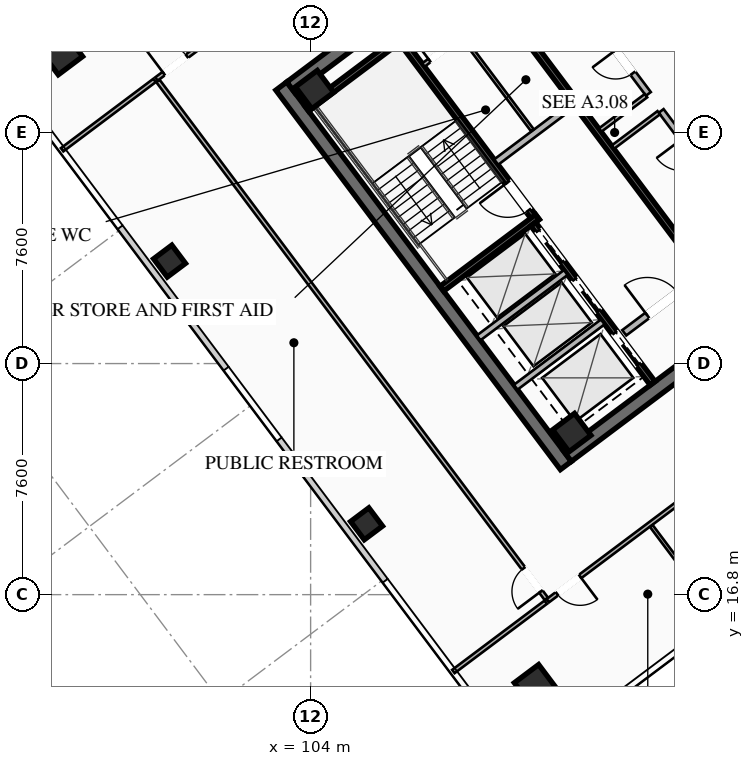
"""IFC4 building model, lengths in metres.
Left out: names, types, materials, properties, quantities, classifications, styles, units other than length and angle.
Written with IfcOpenShell. Run it as: python <this file> out.ifc"""

import sys

from ifc_helpers import new_model, si_unit, direction, frame, frame_2d, origin, origin_2d, place, context, subcontext, project, spatial, rectangle, hollow_rectangle, extrude, element, fill, save


model = new_model("IFC4")
c1 = context("Model", 3, precision=1e-05, world=origin(), true_north=direction((0.0, 1.0)))
c2 = subcontext(c1, "Body", "Model", "MODEL_VIEW")
j1 = project(units=[si_unit("LENGTHUNIT", "METRE"), si_unit("PLANEANGLEUNIT", "RADIAN")], contexts=[c1])
p1 = place(None, origin())
s1 = spatial("IfcSite", under=j1, at=p1, CompositionType="ELEMENT")
p2 = place(p1, origin())
s2 = spatial("IfcBuilding", under=s1, at=p2, CompositionType="ELEMENT")
p3 = place(p2, frame((0.0, 0.0, 239.7)))
s3 = spatial("IfcBuildingStorey", under=s2, at=p3, CompositionType="ELEMENT", Elevation=239.7)
for number, where, z_axis, x_axis in (
    (1, (112.396, 21.047, 0.0), (0.0, 0.0, 1.0), (-0.6, 0.8, 0.0)),
    (2, (115.604, 42.953, 0.0), (0.0, 0.0, 1.0), (0.6, -0.8, 0.0)),
):
    element("IfcWall", number, at=place(p3, frame(where, z_axis=z_axis, x_axis=x_axis)), inside=s3, PredefinedType="SHEAR", context=c2, shape_type="SweptSolid", body=[
        extrude(rectangle(XDim=15.6, YDim=0.45, at=frame_2d((7.8, 0.0))), origin(), (0.0, 0.0, 1.0), 3.55),
    ])
p4 = place(p3, frame((124.649, 30.518, 0.0), z_axis=(0.0, 0.0, 1.0), x_axis=(-0.8, -0.6, 0.0)))
e3 = element("IfcWall", 3, at=p4, inside=s3, PredefinedType="SHEAR", context=c2, shape_type="SweptSolid", body=[
    extrude(rectangle(XDim=15.26, YDim=0.45, at=frame_2d((7.63, 0.0))), origin(), (0.0, 0.0, 1.0), 3.55),
])
p5 = place(p4, frame((9.33, 0.0, 0.0)))
e4 = element("IfcOpeningElement", 4, at=p5, cuts=e3, PredefinedType="OPENING", context=c2, shape_type="SweptSolid", body=[
    extrude(rectangle(XDim=1.25, YDim=2.25, at=frame_2d((0.625, 1.125))), frame((0.0, 0.235, 0.0), z_axis=(0.0, -1.0, 0.0), x_axis=(1.0, 0.0, 0.0)), (0.0, 0.0, 1.0), 0.47),
])
p6 = place(p4, frame((4.28, 0.0, 0.0)))
e5 = element("IfcOpeningElement", 5, at=p6, cuts=e3, PredefinedType="OPENING", context=c2, shape_type="SweptSolid", body=[
    extrude(rectangle(XDim=1.25, YDim=2.25, at=frame_2d((0.625, 1.125))), frame((0.0, 0.235, 0.0), z_axis=(0.0, -1.0, 0.0), x_axis=(1.0, 0.0, 0.0)), (0.0, 0.0, 1.0), 0.47),
])
p7 = place(p3, frame((103.351, 33.482, 0.0), z_axis=(0.0, 0.0, 1.0), x_axis=(0.8, 0.6, 0.0)))
e6 = element("IfcWall", 6, at=p7, inside=s3, PredefinedType="SHEAR", context=c2, shape_type="SweptSolid", body=[
    extrude(rectangle(XDim=15.26, YDim=0.45, at=frame_2d((7.63, 0.0))), origin(), (0.0, 0.0, 1.0), 3.55),
])
p8 = place(p7, frame((4.68, 0.0, 0.0)))
e7 = element("IfcOpeningElement", 7, at=p8, cuts=e6, PredefinedType="OPENING", context=c2, shape_type="SweptSolid", body=[
    extrude(rectangle(XDim=1.25, YDim=2.25, at=frame_2d((0.625, 1.125))), frame((0.0, 0.235, 0.0), z_axis=(0.0, -1.0, 0.0), x_axis=(1.0, 0.0, 0.0)), (0.0, 0.0, 1.0), 0.47),
])
p9 = place(p7, frame((9.73, 0.0, 0.0)))
e8 = element("IfcOpeningElement", 8, at=p9, cuts=e6, PredefinedType="OPENING", context=c2, shape_type="SweptSolid", body=[
    extrude(rectangle(XDim=1.25, YDim=2.25, at=frame_2d((0.625, 1.125))), frame((0.0, 0.235, 0.0), z_axis=(0.0, -1.0, 0.0), x_axis=(1.0, 0.0, 0.0)), (0.0, 0.0, 1.0), 0.47),
])
for number, where, z_axis, x_axis in (
    (9, (112.59, 22.13, 0.0), (0.0, 0.0, 1.0), (0.8, 0.6, 0.0)),
    (10, (104.13, 33.41, 0.0), (0.0, 0.0, 1.0), (0.8, 0.6, 0.0)),
):
    element("IfcColumn", number, at=place(p3, frame(where, z_axis=z_axis, x_axis=x_axis)), inside=s3, PredefinedType="COLUMN", context=c2, shape_type="SweptSolid", body=[
        extrude(hollow_rectangle(XDim=0.9, YDim=0.9, WallThickness=0.04, at=origin_2d()), origin(), (0.0, 0.0, 1.0), 3.37),
    ])
for number, where, z_axis, x_axis in (
    (11, (111.4, 13.8, 0.0), (0.0, 0.0, 1.0), (0.8, 0.6, 0.0)),
    (12, (95.8, 34.6, 0.0), (0.0, 0.0, 1.0), (0.8, 0.6, 0.0)),
):
    element("IfcColumn", number, at=place(p3, frame(where, z_axis=z_axis, x_axis=x_axis)), inside=s3, PredefinedType="COLUMN", context=c2, shape_type="SweptSolid", body=[
        extrude(hollow_rectangle(XDim=1.0, YDim=1.0, WallThickness=0.04, at=origin_2d()), origin(), (0.0, 0.0, 1.0), 3.37),
    ])
for number, where, z_axis, x_axis in (
    (13, (99.36, 27.77, 0.0), (0.0, 0.0, 1.0), (0.8, 0.6, 0.0)),
    (14, (105.84, 19.13, 0.0), (0.0, 0.0, 1.0), (0.8, 0.6, 0.0)),
):
    element("IfcColumn", number, at=place(p3, frame(where, z_axis=z_axis, x_axis=x_axis)), inside=s3, PredefinedType="COLUMN", context=c2, shape_type="SweptSolid", body=[
        extrude(hollow_rectangle(XDim=0.75, YDim=0.75, WallThickness=0.032, at=origin_2d()), origin(), (0.0, 0.0, 1.0), 3.37),
    ])
p10 = place(p3, frame((111.44, 29.08, 0.0), z_axis=(0.0, 0.0, 1.0), x_axis=(-0.59999041401, 0.800007189403, 0.0)))
e15 = element("IfcWall", 15, at=p10, inside=s3, PredefinedType="SHEAR", context=c2, shape_type="SweptSolid", body=[
    extrude(rectangle(XDim=8.15, YDim=0.2, at=frame_2d((4.075, 0.0))), origin(), (0.0, 0.0, 1.0), 3.37),
])
p11 = place(p10, frame((0.45, 0.0, 0.0)))
e16 = element("IfcOpeningElement", 16, at=p11, cuts=e15, PredefinedType="OPENING", context=c2, shape_type="SweptSolid", body=[
    extrude(rectangle(XDim=1.15, YDim=2.2, at=frame_2d((0.575, 1.1))), frame((0.0, 0.11, 0.0), z_axis=(0.0, -1.0, 0.0), x_axis=(1.0, 0.0, 0.0)), (0.0, 0.0, 1.0), 0.22),
])
for number, where, z_axis, x_axis in (
    (17, (108.316, 26.862, 0.0), (0.0, 0.0, 1.0), (0.8, 0.6, 0.0)),
    (18, (103.876, 32.782, 0.0), (0.0, 0.0, 1.0), (0.8, 0.6, 0.0)),
):
    element("IfcWall", number, at=place(p3, frame(where, z_axis=z_axis, x_axis=x_axis)), inside=s3, PredefinedType="SHEAR", context=c2, shape_type="SweptSolid", body=[
        extrude(rectangle(XDim=3.93, YDim=0.2, at=frame_2d((1.965, 0.0))), origin(), (0.0, 0.0, 1.0), 3.37),
    ])
p12 = place(p3, frame((118.058, 25.856, 0.0), z_axis=(0.0, 0.0, 1.0), x_axis=(-0.600002657301, 0.799998007018, 0.0)))
e19 = element("IfcWall", 19, at=p12, inside=s3, PredefinedType="SHEAR", context=c2, shape_type="SweptSolid", body=[
    extrude(rectangle(XDim=14.7, YDim=0.2, at=frame_2d((7.35, 0.0))), origin(), (0.0, 0.0, 1.0), 3.37),
])
p13 = place(p3, frame((110.104, 31.028, 0.0), z_axis=(0.0, 0.0, 1.0), x_axis=(0.800018601094, 0.59997519774, 0.0)))
e20 = element("IfcWall", 20, at=p13, inside=s3, PredefinedType="SOLIDWALL", context=c2, shape_type="SweptSolid", body=[
    extrude(rectangle(XDim=3.15, YDim=0.22, at=frame_2d((1.575, 0.0))), origin(), (0.0, 0.0, 1.0), 2.723),
])
p14 = place(p3, frame((114.316, 25.412, 0.0), z_axis=(0.0, 0.0, 1.0), x_axis=(0.800018601094, 0.59997519774, 0.0)))
e21 = element("IfcWall", 21, at=p14, inside=s3, PredefinedType="SOLIDWALL", context=c2, shape_type="SweptSolid", body=[
    extrude(rectangle(XDim=3.15, YDim=0.22, at=frame_2d((1.575, 0.0))), origin(), (0.0, 0.0, 1.0), 2.723),
])
p15 = place(p14, frame((0.95, 0.0, 0.0)))
e22 = element("IfcOpeningElement", 22, at=p15, cuts=e21, PredefinedType="OPENING", context=c2, shape_type="SweptSolid", body=[
    extrude(rectangle(XDim=1.25, YDim=2.25, at=frame_2d((0.625, 1.125))), frame((0.0, 0.12, 0.0), z_axis=(0.0, -1.0, 0.0), x_axis=(1.0, 0.0, 0.0)), (0.0, 0.0, 1.0), 0.24),
])
p16 = place(p3, frame((115.25, 23.75, 0.0), z_axis=(0.0, 0.0, 1.0), x_axis=(-0.599994036198, 0.800004472816, 0.0)))
e23 = element("IfcWall", 23, at=p16, inside=s3, PredefinedType="SHEAR", context=c2, shape_type="SweptSolid", body=[
    extrude(rectangle(XDim=6.55, YDim=0.2, at=frame_2d((3.275, 0.0))), origin(), (0.0, 0.0, 1.0), 3.37),
])
p17 = place(p16, frame((4.975, 0.0, 0.0)))
e24 = element("IfcOpeningElement", 24, at=p17, cuts=e23, PredefinedType="OPENING", context=c2, shape_type="SweptSolid", body=[
    extrude(rectangle(XDim=1.3, YDim=2.25, at=frame_2d((0.65, 1.125))), frame((0.0, 0.11, 0.0), z_axis=(0.0, -1.0, 0.0), x_axis=(1.0, 0.0, 0.0)), (0.0, 0.0, 1.0), 0.22),
])
p18 = place(p16, frame((2.975, 0.0, 0.0)))
e25 = element("IfcOpeningElement", 25, at=p18, cuts=e23, PredefinedType="OPENING", context=c2, shape_type="SweptSolid", body=[
    extrude(rectangle(XDim=1.3, YDim=2.25, at=frame_2d((0.65, 1.125))), frame((0.0, 0.11, 0.0), z_axis=(0.0, -1.0, 0.0), x_axis=(1.0, 0.0, 0.0)), (0.0, 0.0, 1.0), 0.22),
])
p19 = place(p16, frame((0.775, 0.0, 0.0)))
e26 = element("IfcOpeningElement", 26, at=p19, cuts=e23, PredefinedType="OPENING", context=c2, shape_type="SweptSolid", body=[
    extrude(rectangle(XDim=1.3, YDim=2.25, at=frame_2d((0.65, 1.125))), frame((0.0, 0.11, 0.0), z_axis=(0.0, -1.0, 0.0), x_axis=(1.0, 0.0, 0.0)), (0.0, 0.0, 1.0), 0.22),
])
for number, where, z_axis, x_axis in (
    (27, (110.746, 23.622, 0.0), (0.0, 0.0, 1.0), (0.8, 0.6, 0.0)),
    (28, (109.528, 25.246, 0.0), (0.0, 0.0, 1.0), (0.8, 0.6, 0.0)),
):
    element("IfcWall", number, at=place(p3, frame(where, z_axis=z_axis, x_axis=x_axis)), inside=s3, PredefinedType="SOLIDWALL", context=c2, shape_type="SweptSolid", body=[
        extrude(rectangle(XDim=3.58, YDim=0.2, at=frame_2d((1.79, 0.0))), origin(), (0.0, 0.0, 1.0), 3.37),
    ])
p20 = place(p3, frame((107.71, 34.22, 0.0), z_axis=(0.0, 0.0, 1.0), x_axis=(0.799981399002, 0.60002480053, 0.0)))
e29 = element("IfcWall", 29, at=p20, inside=s3, PredefinedType="PARTITIONING", context=c2, shape_type="SweptSolid", body=[
    extrude(rectangle(XDim=3.15, YDim=0.135, at=frame_2d((1.575, 0.0))), origin(), (0.0, 0.0, 1.0), 2.723),
])
p21 = place(p20, frame((0.25, 0.0, 0.0)))
e30 = element("IfcOpeningElement", 30, at=p21, cuts=e29, PredefinedType="OPENING", context=c2, shape_type="SweptSolid", body=[
    extrude(rectangle(XDim=0.95, YDim=2.05, at=frame_2d((0.475, 1.025))), frame((0.0, 0.077, 0.0), z_axis=(0.0, -1.0, 0.0), x_axis=(1.0, 0.0, 0.0)), (0.0, 0.0, 1.0), 0.155),
])
p22 = place(p20, frame((1.95, 0.0, 0.0)))
e31 = element("IfcOpeningElement", 31, at=p22, cuts=e29, PredefinedType="OPENING", context=c2, shape_type="SweptSolid", body=[
    extrude(rectangle(XDim=0.95, YDim=2.05, at=frame_2d((0.475, 1.025))), frame((0.0, 0.077, 0.0), z_axis=(0.0, -1.0, 0.0), x_axis=(1.0, 0.0, 0.0)), (0.0, 0.0, 1.0), 0.155),
])
p23 = place(p3, frame((111.296, 32.072, 0.0), z_axis=(0.0, 0.0, 1.0), x_axis=(-0.59995887973, 0.800030838552, 0.0)))
e32 = element("IfcWall", 32, at=p23, inside=s3, PredefinedType="PARTITIONING", context=c2, shape_type="SweptSolid", body=[
    extrude(rectangle(XDim=3.8, YDim=0.11, at=frame_2d((1.9, 0.0))), origin(), (0.0, 0.0, 1.0), 2.723),
])
p24 = place(p3, frame((119.73, 27.11, 0.0), z_axis=(0.0, 0.0, 1.0), x_axis=(-0.600005580459, 0.799995814625, 0.0)))
e33 = element("IfcWall", 33, at=p24, inside=s3, PredefinedType="SOLIDWALL", context=c2, shape_type="SweptSolid", body=[
    extrude(rectangle(XDim=7.0, YDim=0.2, at=frame_2d((3.5, 0.0))), origin(), (0.0, 0.0, 1.0), 2.723),
])
p25 = place(p24, frame((0.85, 0.0, 0.0)))
e34 = element("IfcOpeningElement", 34, at=p25, cuts=e33, PredefinedType="OPENING", context=c2, shape_type="SweptSolid", body=[
    extrude(rectangle(XDim=0.95, YDim=2.05, at=frame_2d((0.475, 1.025))), frame((0.0, 0.11, 0.0), z_axis=(0.0, -1.0, 0.0), x_axis=(1.0, 0.0, 0.0)), (0.0, 0.0, 1.0), 0.22),
])
p26 = place(p24, frame((4.8, 0.0, 0.0)))
e35 = element("IfcOpeningElement", 35, at=p26, cuts=e33, PredefinedType="OPENING", context=c2, shape_type="SweptSolid", body=[
    extrude(rectangle(XDim=1.05, YDim=2.2, at=frame_2d((0.525, 1.1))), frame((0.0, 0.11, 0.0), z_axis=(0.0, -1.0, 0.0), x_axis=(1.0, 0.0, 0.0)), (0.0, 0.0, 1.0), 0.22),
])
p27 = place(p3, frame((113.946, 31.522, 0.0), z_axis=(0.0, 0.0, 1.0), x_axis=(0.8, 0.6, 0.0)))
e36 = element("IfcWall", 36, at=p27, inside=s3, PredefinedType="PARTITIONING", context=c2, shape_type="SweptSolid", body=[
    extrude(rectangle(XDim=1.88, YDim=0.135, at=frame_2d((0.94, 0.0))), origin(), (0.0, 0.0, 1.0), 2.723),
])
p28 = place(p3, frame((115.11, 33.27, 0.0), z_axis=(0.0, 0.0, 1.0), x_axis=(-0.600011160345, 0.79999162962, 0.0)))
e37 = element("IfcWall", 37, at=p28, inside=s3, PredefinedType="SOLIDWALL", context=c2, shape_type="SweptSolid", body=[
    extrude(rectangle(XDim=7.0, YDim=0.2, at=frame_2d((3.5, 0.0))), origin(), (0.0, 0.0, 1.0), 2.723),
])
p29 = place(p28, frame((0.85, 0.0, 0.0)))
e38 = element("IfcOpeningElement", 38, at=p29, cuts=e37, PredefinedType="OPENING", context=c2, shape_type="SweptSolid", body=[
    extrude(rectangle(XDim=0.95, YDim=2.05, at=frame_2d((0.475, 1.025))), frame((0.0, 0.11, 0.0), z_axis=(0.0, -1.0, 0.0), x_axis=(1.0, 0.0, 0.0)), (0.0, 0.0, 1.0), 0.22),
])
p30 = place(p28, frame((4.85, 0.0, 0.0)))
e39 = element("IfcOpeningElement", 39, at=p30, cuts=e37, PredefinedType="OPENING", context=c2, shape_type="SweptSolid", body=[
    extrude(rectangle(XDim=0.95, YDim=2.05, at=frame_2d((0.475, 1.025))), frame((0.0, 0.11, 0.0), z_axis=(0.0, -1.0, 0.0), x_axis=(1.0, 0.0, 0.0)), (0.0, 0.0, 1.0), 0.22),
])
p31 = place(p3, frame((113.526, 32.082, 0.0), z_axis=(0.0, 0.0, 1.0), x_axis=(0.800046745961, 0.599937666993, 0.0)))
e40 = element("IfcWall", 40, at=p31, inside=s3, PredefinedType="PARTITIONING", context=c2, shape_type="SweptSolid", body=[
    extrude(rectangle(XDim=1.88, YDim=0.135, at=frame_2d((0.94, 0.0))), origin(), (0.0, 0.0, 1.0), 2.723),
])
p32 = place(p3, frame((98.93, 33.76, 0.0), z_axis=(0.0, 0.0, 1.0), x_axis=(0.8, 0.6, 0.0)))
e41 = element("IfcWall", 41, at=p32, inside=s3, PredefinedType="PARTITIONING", context=c2, shape_type="SweptSolid", body=[
    extrude(rectangle(XDim=23.85, YDim=0.135, at=frame_2d((11.925, 0.0))), origin(), (0.0, 0.0, 1.0), 2.723),
])
p33 = place(p32, frame((0.3, 0.0, 0.0)))
e42 = element("IfcOpeningElement", 42, at=p33, cuts=e41, PredefinedType="OPENING", context=c2, shape_type="SweptSolid", body=[
    extrude(rectangle(XDim=0.95, YDim=2.05, at=frame_2d((0.475, 1.025))), frame((0.0, 0.077, 0.0), z_axis=(0.0, -1.0, 0.0), x_axis=(1.0, 0.0, 0.0)), (0.0, 0.0, 1.0), 0.155),
])
p34 = place(p32, frame((10.779, 0.0, 0.0)))
e43 = element("IfcOpeningElement", 43, at=p34, cuts=e41, PredefinedType="OPENING", context=c2, shape_type="SweptSolid", body=[
    extrude(rectangle(XDim=0.95, YDim=2.05, at=frame_2d((0.475, 1.025))), frame((0.0, 0.077, 0.0), z_axis=(0.0, -1.0, 0.0), x_axis=(1.0, 0.0, 0.0)), (0.0, 0.0, 1.0), 0.155),
])
p35 = place(p32, frame((14.585, 0.0, 0.0)))
e44 = element("IfcOpeningElement", 44, at=p35, cuts=e41, PredefinedType="OPENING", context=c2, shape_type="SweptSolid", body=[
    extrude(rectangle(XDim=0.95, YDim=2.05, at=frame_2d((0.475, 1.025))), frame((0.0, 0.077, 0.0), z_axis=(0.0, -1.0, 0.0), x_axis=(1.0, 0.0, 0.0)), (0.0, 0.0, 1.0), 0.155),
])
p36 = place(p32, frame((22.6, 0.0, 0.0)))
e45 = element("IfcOpeningElement", 45, at=p36, cuts=e41, PredefinedType="OPENING", context=c2, shape_type="SweptSolid", body=[
    extrude(rectangle(XDim=0.95, YDim=2.05, at=frame_2d((0.475, 1.025))), frame((0.0, 0.077, 0.0), z_axis=(0.0, -1.0, 0.0), x_axis=(1.0, 0.0, 0.0)), (0.0, 0.0, 1.0), 0.155),
])
p37 = place(p3, frame((124.12, 25.84, 0.0), z_axis=(0.0, 0.0, 1.0), x_axis=(-0.800001902384, -0.599997463479, 0.0)))
e46 = element("IfcWall", 46, at=p37, inside=s3, PredefinedType="PARTITIONING", context=c2, shape_type="SweptSolid", body=[
    extrude(rectangle(XDim=15.4, YDim=0.135, at=frame_2d((7.7, 0.0))), origin(), (0.0, 0.0, 1.0), 2.723),
])
p38 = place(p37, frame((14.07, 0.0, 0.0)))
e47 = element("IfcOpeningElement", 47, at=p38, cuts=e46, PredefinedType="OPENING", context=c2, shape_type="SweptSolid", body=[
    extrude(rectangle(XDim=0.95, YDim=2.05, at=frame_2d((0.475, 1.025))), frame((0.0, 0.077, 0.0), z_axis=(0.0, -1.0, 0.0), x_axis=(1.0, 0.0, 0.0)), (0.0, 0.0, 1.0), 0.155),
])
p39 = place(p37, frame((3.64, 0.0, 0.0)))
e48 = element("IfcOpeningElement", 48, at=p39, cuts=e46, PredefinedType="OPENING", context=c2, shape_type="SweptSolid", body=[
    extrude(rectangle(XDim=0.95, YDim=2.05, at=frame_2d((0.475, 1.025))), frame((0.0, 0.077, 0.0), z_axis=(0.0, -1.0, 0.0), x_axis=(1.0, 0.0, 0.0)), (0.0, 0.0, 1.0), 0.155),
])
p40 = place(p37, frame((0.38, 0.0, 0.0)))
e49 = element("IfcOpeningElement", 49, at=p40, cuts=e46, PredefinedType="OPENING", context=c2, shape_type="SweptSolid", body=[
    extrude(rectangle(XDim=0.95, YDim=2.05, at=frame_2d((0.475, 1.025))), frame((0.0, 0.077, 0.0), z_axis=(0.0, -1.0, 0.0), x_axis=(1.0, 0.0, 0.0)), (0.0, 0.0, 1.0), 0.155),
])
p41 = place(p3, frame((117.488, 16.016, 0.0), z_axis=(0.0, 0.0, 1.0), x_axis=(-0.600030839559, 0.799976869402, 0.0)))
e50 = element("IfcWall", 50, at=p41, inside=s3, PredefinedType="PARTITIONING", context=c2, shape_type="SweptSolid", body=[
    extrude(rectangle(XDim=3.8, YDim=0.11, at=frame_2d((1.9, 0.0))), origin(), (0.0, 0.0, 1.0), 2.723),
])
p42 = place(p3, frame((111.752, 16.664, 0.0), z_axis=(0.0, 0.0, 1.0), x_axis=(-0.599998165212, 0.800001376088, 0.0)))
e51 = element("IfcWall", 51, at=p42, inside=s3, PredefinedType="PARTITIONING", context=c2, shape_type="SweptSolid", body=[
    extrude(rectangle(XDim=21.29, YDim=0.135, at=frame_2d((10.645, 0.0))), origin(), (0.0, 0.0, 1.0), 2.723),
])
p43 = place(p42, frame((0.3, 0.0, 0.0)))
e52 = element("IfcOpeningElement", 52, at=p43, cuts=e51, PredefinedType="OPENING", context=c2, shape_type="SweptSolid", body=[
    extrude(rectangle(XDim=0.95, YDim=2.05, at=frame_2d((0.475, 1.025))), frame((0.0, 0.077, 0.0), z_axis=(0.0, -1.0, 0.0), x_axis=(1.0, 0.0, 0.0)), (0.0, 0.0, 1.0), 0.155),
])
for number, where, z_axis, x_axis in (
    (53, (98.866, 33.712, 0.0), (0.0, 0.0, 1.0), (-0.8, -0.6, 0.0)),
    (54, (108.696, 14.272, 0.0), (0.0, 0.0, 1.0), (0.8, 0.6, 0.0)),
):
    element("IfcWall", number, at=place(p3, frame(where, z_axis=z_axis, x_axis=x_axis)), inside=s3, PredefinedType="PARTITIONING", context=c2, shape_type="SweptSolid", body=[
        extrude(rectangle(XDim=3.8, YDim=0.135, at=frame_2d((1.9, 0.0))), origin(), (0.0, 0.0, 1.0), 2.723),
    ])
p44 = place(p11, origin())
e55 = element("IfcDoor", 55, at=p44, inside=s3, OperationType="SINGLE_SWING_RIGHT", PredefinedType="DOOR", context=c2, shape_type="SweptSolid", body=[
    extrude(rectangle(XDim=1.15, YDim=2.2, at=frame_2d((0.575, 1.1))), frame((0.0, 0.025, 0.0), z_axis=(0.0, -1.0, 0.0), x_axis=(1.0, 0.0, 0.0)), (0.0, 0.0, 1.0), 0.05),
])
fill(e16, e55)
p45 = place(p15, origin())
e56 = element("IfcDoor", 56, at=p45, inside=s3, OperationType="SINGLE_SWING_LEFT", PredefinedType="DOOR", context=c2, shape_type="SweptSolid", body=[
    extrude(rectangle(XDim=1.25, YDim=2.25, at=frame_2d((0.625, 1.125))), frame((0.0, 0.025, 0.0), z_axis=(0.0, -1.0, 0.0), x_axis=(1.0, 0.0, 0.0)), (0.0, 0.0, 1.0), 0.05),
])
fill(e22, e56)
p46 = place(p21, origin())
e57 = element("IfcDoor", 57, at=p46, inside=s3, OperationType="SINGLE_SWING_LEFT", PredefinedType="DOOR", context=c2, shape_type="SweptSolid", body=[
    extrude(rectangle(XDim=0.95, YDim=2.05, at=frame_2d((0.475, 1.025))), frame((0.0, 0.025, 0.0), z_axis=(0.0, -1.0, 0.0), x_axis=(1.0, 0.0, 0.0)), (0.0, 0.0, 1.0), 0.05),
])
fill(e30, e57)
p47 = place(p29, origin())
e58 = element("IfcDoor", 58, at=p47, inside=s3, OperationType="SINGLE_SWING_RIGHT", PredefinedType="DOOR", context=c2, shape_type="SweptSolid", body=[
    extrude(rectangle(XDim=0.95, YDim=2.05, at=frame_2d((0.475, 1.025))), frame((0.0, 0.025, 0.0), z_axis=(0.0, -1.0, 0.0), x_axis=(1.0, 0.0, 0.0)), (0.0, 0.0, 1.0), 0.05),
])
fill(e38, e58)
p48 = place(p33, origin())
e59 = element("IfcDoor", 59, at=p48, inside=s3, OperationType="SINGLE_SWING_LEFT", PredefinedType="DOOR", context=c2, shape_type="SweptSolid", body=[
    extrude(rectangle(XDim=0.95, YDim=2.05, at=frame_2d((0.475, 1.025))), frame((0.0, 0.025, 0.0), z_axis=(0.0, -1.0, 0.0), x_axis=(1.0, 0.0, 0.0)), (0.0, 0.0, 1.0), 0.05),
])
fill(e42, e59)
p49 = place(p38, origin())
e60 = element("IfcDoor", 60, at=p49, inside=s3, OperationType="SINGLE_SWING_LEFT", PredefinedType="DOOR", context=c2, shape_type="SweptSolid", body=[
    extrude(rectangle(XDim=0.95, YDim=2.05, at=frame_2d((0.475, 1.025))), frame((0.0, 0.025, 0.0), z_axis=(0.0, -1.0, 0.0), x_axis=(1.0, 0.0, 0.0)), (0.0, 0.0, 1.0), 0.05),
])
fill(e47, e60)
p50 = place(p43, origin())
e61 = element("IfcDoor", 61, at=p50, inside=s3, OperationType="SINGLE_SWING_LEFT", PredefinedType="DOOR", context=c2, shape_type="SweptSolid", body=[
    extrude(rectangle(XDim=0.95, YDim=2.05, at=frame_2d((0.475, 1.025))), frame((0.0, 0.025, 0.0), z_axis=(0.0, -1.0, 0.0), x_axis=(1.0, 0.0, 0.0)), (0.0, 0.0, 1.0), 0.05),
])
fill(e52, e61)
p51 = place(p17, origin())
e62 = element("IfcDoor", 62, at=p51, inside=s3, OperationType="SLIDING_TO_LEFT", PredefinedType="DOOR", context=c2, shape_type="SweptSolid", body=[
    extrude(rectangle(XDim=1.3, YDim=2.25, at=frame_2d((0.65, 1.125))), frame((0.0, 0.025, 0.0), z_axis=(0.0, -1.0, 0.0), x_axis=(1.0, 0.0, 0.0)), (0.0, 0.0, 1.0), 0.05),
])
fill(e24, e62)
p52 = place(p18, origin())
e63 = element("IfcDoor", 63, at=p52, inside=s3, OperationType="SLIDING_TO_LEFT", PredefinedType="DOOR", context=c2, shape_type="SweptSolid", body=[
    extrude(rectangle(XDim=1.3, YDim=2.25, at=frame_2d((0.65, 1.125))), frame((0.0, 0.025, 0.0), z_axis=(0.0, -1.0, 0.0), x_axis=(1.0, 0.0, 0.0)), (0.0, 0.0, 1.0), 0.05),
])
fill(e25, e63)
p53 = place(p19, origin())
e64 = element("IfcDoor", 64, at=p53, inside=s3, OperationType="SLIDING_TO_LEFT", PredefinedType="DOOR", context=c2, shape_type="SweptSolid", body=[
    extrude(rectangle(XDim=1.3, YDim=2.25, at=frame_2d((0.65, 1.125))), frame((0.0, 0.025, 0.0), z_axis=(0.0, -1.0, 0.0), x_axis=(1.0, 0.0, 0.0)), (0.0, 0.0, 1.0), 0.05),
])
fill(e26, e64)
save(model, sys.argv[1])
